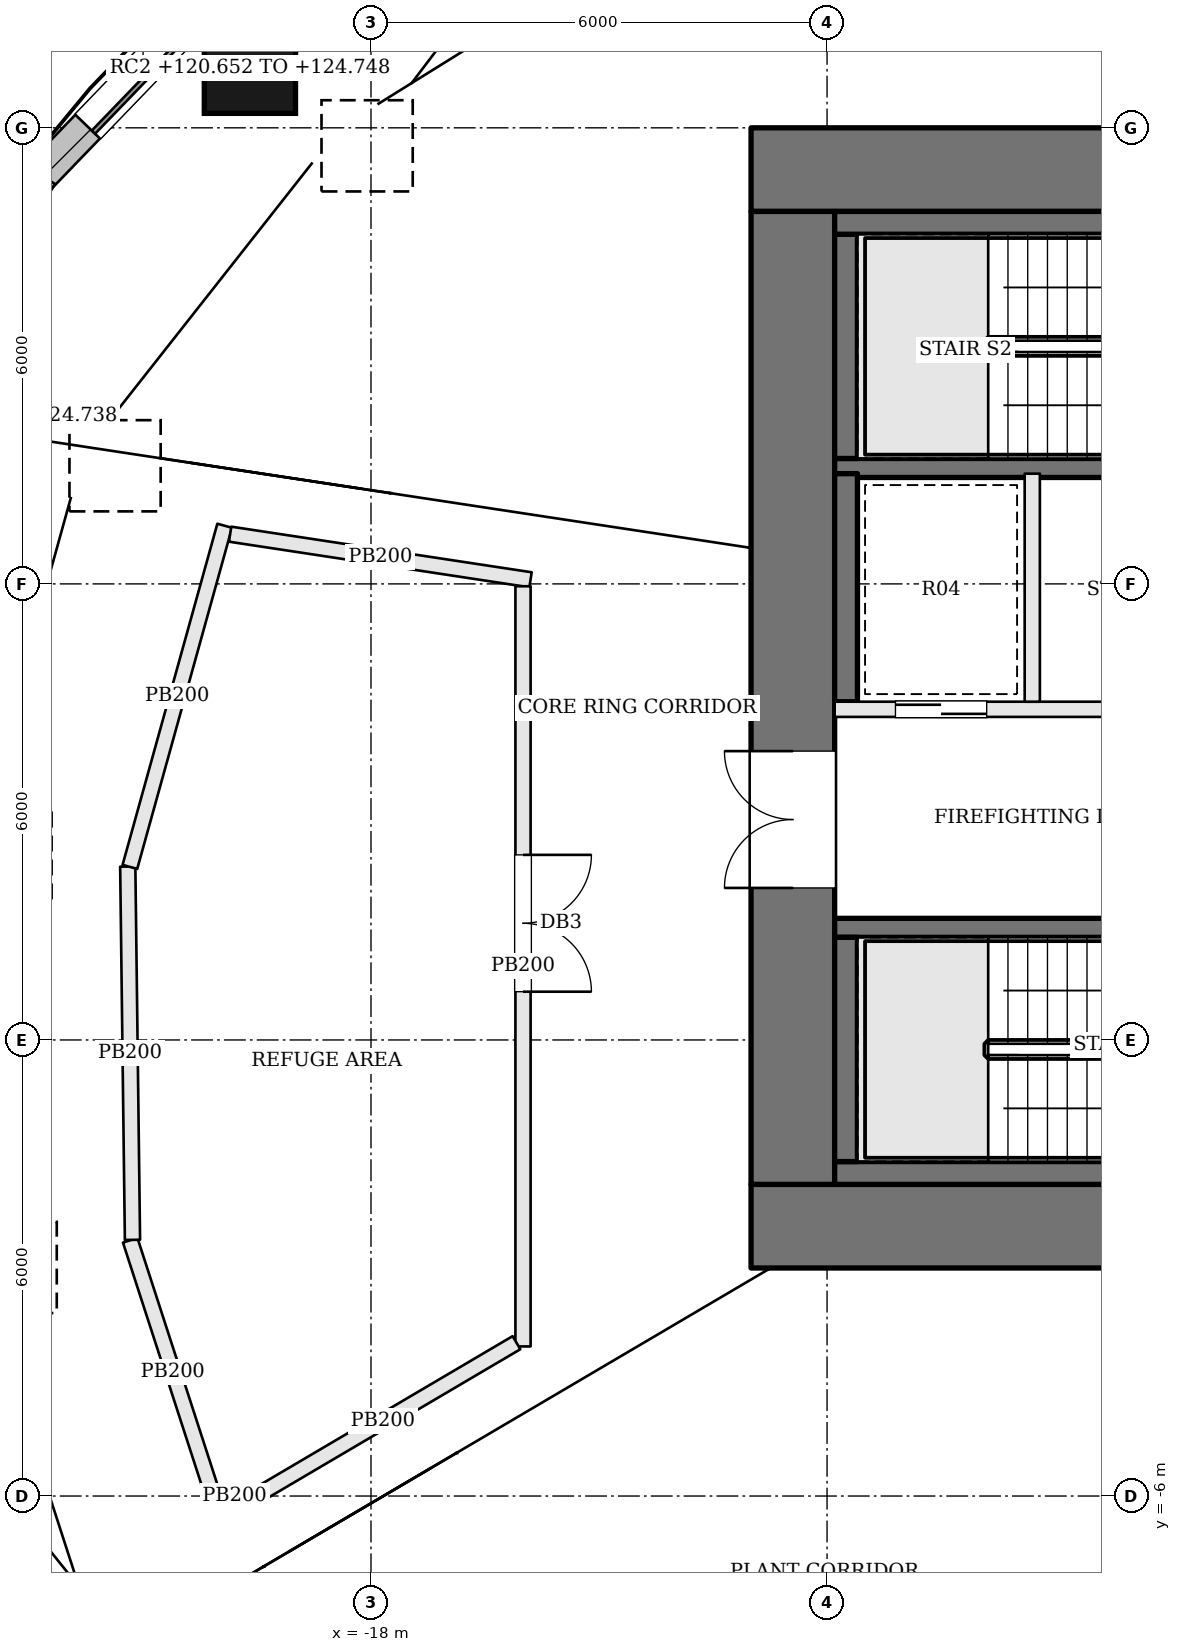
"""IFC4 building model, lengths in metres.
Left out: names, types, materials, properties, quantities, classifications, styles, units other than length and angle.
Written with IfcOpenShell. Run it as: python <this file> out.ifc"""

import sys

from ifc_helpers import new_model, si_unit, direction, frame, frame_2d, origin, origin_2d, place, context, subcontext, project, spatial, rectangle, extrude, element, fill, save


model = new_model("IFC4")
c1 = context("Model", 3, precision=1e-05, world=origin(), true_north=direction((0.0, 1.0)))
c2 = subcontext(c1, "Body", "Model", "MODEL_VIEW")
j1 = project(units=[si_unit("LENGTHUNIT", "METRE"), si_unit("PLANEANGLEUNIT", "RADIAN")], contexts=[c1])
p1 = place(None, origin())
s1 = spatial("IfcSite", under=j1, at=p1, CompositionType="ELEMENT")
p2 = place(p1, origin())
s2 = spatial("IfcBuilding", under=s1, at=p2, CompositionType="ELEMENT")
p3 = place(p2, frame((0.0, 0.0, 121.2)))
s3 = spatial("IfcBuildingStorey", under=s2, at=p3, CompositionType="ELEMENT", Elevation=121.2)
p4 = place(p3, frame((-13.0, 11.45, 0.0), z_axis=(0.0, 0.0, 1.0), x_axis=(1.0, 0.0, 0.0)))
e1 = element("IfcWall", 1, at=p4, inside=s3, PredefinedType="SHEAR", context=c2, shape_type="SweptSolid", body=[
    extrude(rectangle(XDim=26.0, YDim=1.1, at=frame_2d((13.0, 0.0))), origin(), (0.0, 0.0, 1.0), 4.5),
])
p5 = place(p4, frame((8.975, 0.0, 0.0)))
e2 = element("IfcOpeningElement", 2, at=p5, cuts=e1, PredefinedType="OPENING", context=c2, shape_type="SweptSolid", body=[
    extrude(rectangle(XDim=0.7, YDim=2.1, at=frame_2d((0.35, 1.05))), frame((0.0, 0.56, 0.0), z_axis=(0.0, -1.0, 0.0), x_axis=(1.0, 0.0, 0.0)), (0.0, 0.0, 1.0), 1.12),
])
p6 = place(p4, frame((11.575, 0.0, 0.0)))
e3 = element("IfcOpeningElement", 3, at=p6, cuts=e1, PredefinedType="OPENING", context=c2, shape_type="SweptSolid", body=[
    extrude(rectangle(XDim=1.2, YDim=2.1, at=frame_2d((0.6, 1.05))), frame((0.0, 0.56, 0.0), z_axis=(0.0, -1.0, 0.0), x_axis=(1.0, 0.0, 0.0)), (0.0, 0.0, 1.0), 1.12),
])
p7 = place(p4, frame((14.675, 0.0, 0.0)))
e4 = element("IfcOpeningElement", 4, at=p7, cuts=e1, PredefinedType="OPENING", context=c2, shape_type="SweptSolid", body=[
    extrude(rectangle(XDim=0.7, YDim=2.1, at=frame_2d((0.35, 1.05))), frame((0.0, 0.56, 0.0), z_axis=(0.0, -1.0, 0.0), x_axis=(1.0, 0.0, 0.0)), (0.0, 0.0, 1.0), 1.12),
])
p8 = place(p4, frame((16.725, 0.0, 0.0)))
e5 = element("IfcOpeningElement", 5, at=p8, cuts=e1, PredefinedType="OPENING", context=c2, shape_type="SweptSolid", body=[
    extrude(rectangle(XDim=0.7, YDim=2.1, at=frame_2d((0.35, 1.05))), frame((0.0, 0.56, 0.0), z_axis=(0.0, -1.0, 0.0), x_axis=(1.0, 0.0, 0.0)), (0.0, 0.0, 1.0), 1.12),
])
p9 = place(p4, frame((6.88, 0.0, 0.0)))
e6 = element("IfcOpeningElement", 6, at=p9, cuts=e1, PredefinedType="OPENING", context=c2, shape_type="SweptSolid", body=[
    extrude(rectangle(XDim=1.0, YDim=2.1, at=frame_2d((0.5, 1.05))), frame((0.0, 0.56, 0.0), z_axis=(0.0, -1.0, 0.0), x_axis=(1.0, 0.0, 0.0)), (0.0, 0.0, 1.0), 1.12),
])
p10 = place(p4, frame((18.12, 0.0, 0.0)))
e7 = element("IfcOpeningElement", 7, at=p10, cuts=e1, PredefinedType="OPENING", context=c2, shape_type="SweptSolid", body=[
    extrude(rectangle(XDim=1.0, YDim=2.1, at=frame_2d((0.5, 1.05))), frame((0.0, 0.56, 0.0), z_axis=(0.0, -1.0, 0.0), x_axis=(1.0, 0.0, 0.0)), (0.0, 0.0, 1.0), 1.12),
])
p11 = place(p3, frame((-13.0, -2.45, 0.0), z_axis=(0.0, 0.0, 1.0), x_axis=(1.0, 0.0, 0.0)))
e8 = element("IfcWall", 8, at=p11, inside=s3, PredefinedType="SHEAR", context=c2, shape_type="SweptSolid", body=[
    extrude(rectangle(XDim=26.0, YDim=1.1, at=frame_2d((13.0, 0.0))), origin(), (0.0, 0.0, 1.0), 4.5),
])
p12 = place(p11, frame((9.125, 0.0, 0.0)))
e9 = element("IfcOpeningElement", 9, at=p12, cuts=e8, PredefinedType="OPENING", context=c2, shape_type="SweptSolid", body=[
    extrude(rectangle(XDim=1.2, YDim=2.1, at=frame_2d((0.6, 1.05))), frame((0.0, 0.56, 0.0), z_axis=(0.0, -1.0, 0.0), x_axis=(1.0, 0.0, 0.0)), (0.0, 0.0, 1.0), 1.12),
])
p13 = place(p11, frame((12.375, 0.0, 0.0)))
e10 = element("IfcOpeningElement", 10, at=p13, cuts=e8, PredefinedType="OPENING", context=c2, shape_type="SweptSolid", body=[
    extrude(rectangle(XDim=1.2, YDim=2.1, at=frame_2d((0.6, 1.05))), frame((0.0, 0.56, 0.0), z_axis=(0.0, -1.0, 0.0), x_axis=(1.0, 0.0, 0.0)), (0.0, 0.0, 1.0), 1.12),
])
p14 = place(p11, frame((15.65, 0.0, 0.0)))
e11 = element("IfcOpeningElement", 11, at=p14, cuts=e8, PredefinedType="OPENING", context=c2, shape_type="SweptSolid", body=[
    extrude(rectangle(XDim=1.2, YDim=2.1, at=frame_2d((0.6, 1.05))), frame((0.0, 0.56, 0.0), z_axis=(0.0, -1.0, 0.0), x_axis=(1.0, 0.0, 0.0)), (0.0, 0.0, 1.0), 1.12),
])
p15 = place(p11, frame((6.88, 0.0, 0.0)))
e12 = element("IfcOpeningElement", 12, at=p15, cuts=e8, PredefinedType="OPENING", context=c2, shape_type="SweptSolid", body=[
    extrude(rectangle(XDim=1.0, YDim=2.1, at=frame_2d((0.5, 1.05))), frame((0.0, 0.56, 0.0), z_axis=(0.0, -1.0, 0.0), x_axis=(1.0, 0.0, 0.0)), (0.0, 0.0, 1.0), 1.12),
])
p16 = place(p11, frame((18.12, 0.0, 0.0)))
e13 = element("IfcOpeningElement", 13, at=p16, cuts=e8, PredefinedType="OPENING", context=c2, shape_type="SweptSolid", body=[
    extrude(rectangle(XDim=1.0, YDim=2.1, at=frame_2d((0.5, 1.05))), frame((0.0, 0.56, 0.0), z_axis=(0.0, -1.0, 0.0), x_axis=(1.0, 0.0, 0.0)), (0.0, 0.0, 1.0), 1.12),
])
p17 = place(p3, frame((-12.45, -1.9, 0.0), z_axis=(0.0, 0.0, 1.0), x_axis=(0.0, 1.0, 0.0)))
e14 = element("IfcWall", 14, at=p17, inside=s3, PredefinedType="SHEAR", context=c2, shape_type="SweptSolid", body=[
    extrude(rectangle(XDim=12.8, YDim=1.1, at=frame_2d((6.4, 0.0))), origin(), (0.0, 0.0, 1.0), 4.5),
])
p18 = place(p17, frame((3.9, 0.0, 0.0)))
e15 = element("IfcOpeningElement", 15, at=p18, cuts=e14, PredefinedType="OPENING", context=c2, shape_type="SweptSolid", body=[
    extrude(rectangle(XDim=1.8, YDim=2.1, at=frame_2d((0.9, 1.05))), frame((0.0, 0.56, 0.0), z_axis=(0.0, -1.0, 0.0), x_axis=(1.0, 0.0, 0.0)), (0.0, 0.0, 1.0), 1.12),
])
p19 = place(p3, frame((-19.593, 12.79, -0.548), z_axis=(0.343008470869, -0.228473185077, 0.911123039229), x_axis=(0.554365652735, 0.832273226211, 0.0)))
e16 = element("IfcColumn", 16, at=p19, inside=s3, PredefinedType="COLUMN", context=c2, shape_type="SweptSolid", body=[
    extrude(rectangle(XDim=1.2, YDim=1.2, at=origin_2d()), origin(), (0.0, 0.0, 1.0), 4.496),
])
p20 = place(p3, frame((-23.185, 8.21, -0.538), z_axis=(0.403040867298, -0.145423769361, 0.903554086147), x_axis=(0.339399243932, 0.940642415171, 0.0)))
e17 = element("IfcColumn", 17, at=p20, inside=s3, PredefinedType="COLUMN", context=c2, shape_type="SweptSolid", body=[
    extrude(rectangle(XDim=1.2, YDim=1.2, at=origin_2d()), origin(), (0.0, 0.0, 1.0), 4.511),
])
p21 = place(p3, frame((-24.669, -3.248, -0.536), z_axis=(0.428524757066, 0.056498658987, 0.90176185), x_axis=(-0.130713362485, 0.991420201967, 0.0)))
e18 = element("IfcColumn", 18, at=p21, inside=s3, PredefinedType="COLUMN", context=c2, shape_type="SweptSolid", body=[
    extrude(rectangle(XDim=1.2, YDim=1.2, at=origin_2d()), origin(), (0.0, 0.0, 1.0), 4.516),
])
p22 = place(p3, frame((-19.611, 14.21, 0.0), z_axis=(0.0, 0.0, 1.0), x_axis=(-0.694225992979, -0.719757091436, 0.0)))
e19 = element("IfcWall", 19, at=p22, inside=s3, PredefinedType="SOLIDWALL", context=c2, shape_type="SweptSolid", body=[
    extrude(rectangle(XDim=3.997, YDim=0.45, at=frame_2d((1.999, 0.0))), origin(), (0.0, 0.0, 1.0), 4.3),
])
p23 = place(p22, frame((0.948, 0.0, 1.2)))
e20 = element("IfcOpeningElement", 20, at=p23, cuts=e19, PredefinedType="OPENING", context=c2, shape_type="SweptSolid", body=[
    extrude(rectangle(XDim=2.1, YDim=1.8, at=frame_2d((1.05, 0.9))), frame((0.0, 0.235, 0.0), z_axis=(0.0, -1.0, 0.0), x_axis=(1.0, 0.0, 0.0)), (0.0, 0.0, 1.0), 0.47),
])
p24 = place(p3, frame((-22.354, 11.376, 0.0), z_axis=(0.0, 0.0, 1.0), x_axis=(-0.502055516261, -0.864835393929, 0.0)))
e21 = element("IfcWall", 21, at=p24, inside=s3, PredefinedType="SOLIDWALL", context=c2, shape_type="SweptSolid", body=[
    extrude(rectangle(XDim=4.049, YDim=0.45, at=frame_2d((2.025, 0.0))), origin(), (0.0, 0.0, 1.0), 4.3),
])
p25 = place(p24, frame((0.975, 0.0, 1.2)))
e22 = element("IfcOpeningElement", 22, at=p25, cuts=e21, PredefinedType="OPENING", context=c2, shape_type="SweptSolid", body=[
    extrude(rectangle(XDim=2.1, YDim=1.8, at=frame_2d((1.05, 0.9))), frame((0.0, 0.235, 0.0), z_axis=(0.0, -1.0, 0.0), x_axis=(1.0, 0.0, 0.0)), (0.0, 0.0, 1.0), 0.47),
])
p26 = place(p3, frame((-11.9, 1.475, 0.0), z_axis=(0.0, 0.0, 1.0), x_axis=(1.0, 0.0, 0.0)))
e23 = element("IfcWall", 23, at=p26, inside=s3, PredefinedType="SOLIDWALL", context=c2, shape_type="SweptSolid", body=[
    extrude(rectangle(XDim=6.8, YDim=0.25, at=frame_2d((3.4, 0.0))), origin(), (0.0, 0.0, 1.0), 4.3),
])
p27 = place(p26, frame((5.5, 0.0, 0.0)))
e24 = element("IfcOpeningElement", 24, at=p27, cuts=e23, PredefinedType="OPENING", context=c2, shape_type="SweptSolid", body=[
    extrude(rectangle(XDim=1.2, YDim=2.1, at=frame_2d((0.6, 1.05))), frame((0.0, 0.135, 0.0), z_axis=(0.0, -1.0, 0.0), x_axis=(1.0, 0.0, 0.0)), (0.0, 0.0, 1.0), 0.27),
])
p28 = place(p3, frame((-11.9, 4.35, 0.0), z_axis=(0.0, 0.0, 1.0), x_axis=(1.0, 0.0, 0.0)))
e25 = element("IfcWall", 25, at=p28, inside=s3, PredefinedType="SOLIDWALL", context=c2, shape_type="SweptSolid", body=[
    extrude(rectangle(XDim=6.8, YDim=0.2, at=frame_2d((3.4, 0.0))), origin(), (0.0, 0.0, 1.0), 4.3),
])
p29 = place(p28, frame((4.1, 0.0, 0.0)))
e26 = element("IfcOpeningElement", 26, at=p29, cuts=e25, PredefinedType="OPENING", context=c2, shape_type="SweptSolid", body=[
    extrude(rectangle(XDim=1.2, YDim=2.1, at=frame_2d((0.6, 1.05))), frame((0.0, 0.11, 0.0), z_axis=(0.0, -1.0, 0.0), x_axis=(1.0, 0.0, 0.0)), (0.0, 0.0, 1.0), 0.22),
])
p30 = place(p28, frame((0.8, 0.0, 0.0)))
e27 = element("IfcOpeningElement", 27, at=p30, cuts=e25, PredefinedType="OPENING", context=c2, shape_type="SweptSolid", body=[
    extrude(rectangle(XDim=1.2, YDim=2.1, at=frame_2d((0.6, 1.05))), frame((0.0, 0.11, 0.0), z_axis=(0.0, -1.0, 0.0), x_axis=(1.0, 0.0, 0.0)), (0.0, 0.0, 1.0), 0.22),
])
p31 = place(p3, frame((-11.9, 7.525, 0.0), z_axis=(0.0, 0.0, 1.0), x_axis=(1.0, 0.0, 0.0)))
e28 = element("IfcWall", 28, at=p31, inside=s3, PredefinedType="SOLIDWALL", context=c2, shape_type="SweptSolid", body=[
    extrude(rectangle(XDim=6.8, YDim=0.25, at=frame_2d((3.4, 0.0))), origin(), (0.0, 0.0, 1.0), 4.3),
])
p32 = place(p31, frame((5.5, 0.0, 0.0)))
e29 = element("IfcOpeningElement", 29, at=p32, cuts=e28, PredefinedType="OPENING", context=c2, shape_type="SweptSolid", body=[
    extrude(rectangle(XDim=1.2, YDim=2.1, at=frame_2d((0.6, 1.05))), frame((0.0, 0.135, 0.0), z_axis=(0.0, -1.0, 0.0), x_axis=(1.0, 0.0, 0.0)), (0.0, 0.0, 1.0), 0.27),
])
p33 = place(p3, frame((-9.3, 4.45, 0.0), z_axis=(0.0, 0.0, 1.0), x_axis=(0.0, 1.0, 0.0)))
e30 = element("IfcWall", 30, at=p33, inside=s3, PredefinedType="SOLIDWALL", context=c2, shape_type="SweptSolid", body=[
    extrude(rectangle(XDim=3.0, YDim=0.2, at=frame_2d((1.5, 0.0))), origin(), (0.0, 0.0, 1.0), 4.3),
])
p34 = place(p3, frame((-11.9, -1.75, 0.0), z_axis=(0.0, 0.0, 1.0), x_axis=(1.0, 0.0, 0.0)))
e31 = element("IfcWall", 31, at=p34, inside=s3, PredefinedType="SOLIDWALL", context=c2, shape_type="SweptSolid", body=[
    extrude(rectangle(XDim=5.78, YDim=0.3, at=frame_2d((2.89, 0.0))), origin(), (0.0, 0.0, 1.0), 4.3),
])
p35 = place(p3, frame((-11.75, -1.6, 0.0), z_axis=(0.0, 0.0, 1.0), x_axis=(0.0, 1.0, 0.0)))
e32 = element("IfcWall", 32, at=p35, inside=s3, PredefinedType="SOLIDWALL", context=c2, shape_type="SweptSolid", body=[
    extrude(rectangle(XDim=2.95, YDim=0.3, at=frame_2d((1.475, 0.0))), origin(), (0.0, 0.0, 1.0), 4.3),
])
p36 = place(p3, frame((-11.75, 4.45, 0.0), z_axis=(0.0, 0.0, 1.0), x_axis=(0.0, 1.0, 0.0)))
e33 = element("IfcWall", 33, at=p36, inside=s3, PredefinedType="SOLIDWALL", context=c2, shape_type="SweptSolid", body=[
    extrude(rectangle(XDim=3.0, YDim=0.3, at=frame_2d((1.5, 0.0))), origin(), (0.0, 0.0, 1.0), 4.3),
])
p37 = place(p3, frame((-11.75, 7.65, 0.0), z_axis=(0.0, 0.0, 1.0), x_axis=(0.0, 1.0, 0.0)))
e34 = element("IfcWall", 34, at=p37, inside=s3, PredefinedType="SOLIDWALL", context=c2, shape_type="SweptSolid", body=[
    extrude(rectangle(XDim=2.95, YDim=0.3, at=frame_2d((1.475, 0.0))), origin(), (0.0, 0.0, 1.0), 4.3),
])
p38 = place(p3, frame((-11.9, 10.75, 0.0), z_axis=(0.0, 0.0, 1.0), x_axis=(1.0, 0.0, 0.0)))
e35 = element("IfcWall", 35, at=p38, inside=s3, PredefinedType="SOLIDWALL", context=c2, shape_type="SweptSolid", body=[
    extrude(rectangle(XDim=5.78, YDim=0.3, at=frame_2d((2.89, 0.0))), origin(), (0.0, 0.0, 1.0), 4.3),
])
p39 = place(p3, frame((-20.046, -6.095, 0.0), z_axis=(0.0, 0.0, 1.0), x_axis=(-0.308485001062, 0.951229206931, 0.0)))
e36 = element("IfcWall", 36, at=p39, inside=s3, PredefinedType="PARTITIONING", context=c2, shape_type="SweptSolid", body=[
    extrude(rectangle(XDim=3.637, YDim=0.2, at=frame_2d((1.819, 0.0))), origin(), (0.0, 0.0, 1.0), 4.3),
])
p40 = place(p3, frame((-21.138, -2.63, 0.0), z_axis=(0.0, 0.0, 1.0), x_axis=(-0.012626385888, 0.999920284012, 0.0)))
e37 = element("IfcWall", 37, at=p40, inside=s3, PredefinedType="PARTITIONING", context=c2, shape_type="SweptSolid", body=[
    extrude(rectangle(XDim=4.911, YDim=0.2, at=frame_2d((2.456, 0.0))), origin(), (0.0, 0.0, 1.0), 4.3),
])
p41 = place(p3, frame((-21.172, 2.277, 0.0), z_axis=(0.0, 0.0, 1.0), x_axis=(0.267735776536, 0.963492373588, 0.0)))
e38 = element("IfcWall", 38, at=p41, inside=s3, PredefinedType="PARTITIONING", context=c2, shape_type="SweptSolid", body=[
    extrude(rectangle(XDim=4.658, YDim=0.2, at=frame_2d((2.329, 0.0))), origin(), (0.0, 0.0, 1.0), 4.3),
])
p42 = place(p3, frame((-19.853, 6.654, 0.0), z_axis=(0.0, 0.0, 1.0), x_axis=(0.988667757091, -0.15012017216, 0.0)))
e39 = element("IfcWall", 39, at=p42, inside=s3, PredefinedType="PARTITIONING", context=c2, shape_type="SweptSolid", body=[
    extrude(rectangle(XDim=3.998, YDim=0.2, at=frame_2d((1.999, 0.0))), origin(), (0.0, 0.0, 1.0), 4.3),
])
p43 = place(p3, frame((-16.0, 5.969, 0.0), z_axis=(0.0, 0.0, 1.0), x_axis=(0.0, -1.0, 0.0)))
e40 = element("IfcWall", 40, at=p43, inside=s3, PredefinedType="PARTITIONING", context=c2, shape_type="SweptSolid", body=[
    extrude(rectangle(XDim=10.001, YDim=0.2, at=frame_2d((5.0, 0.0))), origin(), (0.0, 0.0, 1.0), 4.3),
])
p44 = place(p43, frame((3.534, 0.0, 0.0)))
e41 = element("IfcOpeningElement", 41, at=p44, cuts=e40, PredefinedType="OPENING", context=c2, shape_type="SweptSolid", body=[
    extrude(rectangle(XDim=1.8, YDim=2.1, at=frame_2d((0.9, 1.05))), frame((0.0, 0.11, 0.0), z_axis=(0.0, -1.0, 0.0), x_axis=(1.0, 0.0, 0.0)), (0.0, 0.0, 1.0), 0.22),
])
p45 = place(p3, frame((-16.086, -3.983, 0.0), z_axis=(0.0, 0.0, 1.0), x_axis=(-0.861769442787, -0.5073001355, 0.0)))
e42 = element("IfcWall", 42, at=p45, inside=s3, PredefinedType="PARTITIONING", context=c2, shape_type="SweptSolid", body=[
    extrude(rectangle(XDim=4.077, YDim=0.2, at=frame_2d((2.038, 0.0))), origin(), (0.0, 0.0, 1.0), 4.3),
])
p46 = place(p3, frame((-19.613, -6.0, 0.0), z_axis=(0.0, 0.0, 1.0), x_axis=(-1.0, 0.0, 0.0)))
e43 = element("IfcWall", 43, at=p46, inside=s3, PredefinedType="PARTITIONING", context=c2, shape_type="SweptSolid", body=[
    extrude(rectangle(XDim=0.364, YDim=0.2, at=frame_2d((0.182, 0.0))), origin(), (0.0, 0.0, 1.0), 4.3),
])
p47 = place(p23, origin())
e44 = element("IfcWindow", 44, at=p47, inside=s3, PartitioningType="SINGLE_PANEL", PredefinedType="WINDOW", context=c2, shape_type="SweptSolid", body=[
    extrude(rectangle(XDim=2.1, YDim=1.8, at=frame_2d((1.05, 0.9))), frame((0.0, 0.135, 0.0), z_axis=(0.0, -1.0, 0.0), x_axis=(1.0, 0.0, 0.0)), (0.0, 0.0, 1.0), 0.06),
])
fill(e20, e44)
p48 = place(p18, origin())
e45 = element("IfcDoor", 45, at=p48, inside=s3, OperationType="DOUBLE_DOOR_SINGLE_SWING", PredefinedType="DOOR", context=c2, shape_type="SweptSolid", body=[
    extrude(rectangle(XDim=1.8, YDim=2.1, at=frame_2d((0.9, 1.05))), frame((0.0, 0.025, 0.0), z_axis=(0.0, -1.0, 0.0), x_axis=(1.0, 0.0, 0.0)), (0.0, 0.0, 1.0), 0.05),
])
fill(e15, e45)
p49 = place(p30, origin())
e46 = element("IfcDoor", 46, at=p49, inside=s3, OperationType="SLIDING_TO_RIGHT", PredefinedType="DOOR", context=c2, shape_type="SweptSolid", body=[
    extrude(rectangle(XDim=1.2, YDim=2.1, at=frame_2d((0.6, 1.05))), frame((0.0, 0.025, 0.0), z_axis=(0.0, -1.0, 0.0), x_axis=(1.0, 0.0, 0.0)), (0.0, 0.0, 1.0), 0.05),
])
fill(e27, e46)
p50 = place(p44, origin())
e47 = element("IfcDoor", 47, at=p50, inside=s3, OperationType="DOUBLE_DOOR_SINGLE_SWING", PredefinedType="DOOR", context=c2, shape_type="SweptSolid", body=[
    extrude(rectangle(XDim=1.8, YDim=2.1, at=frame_2d((0.9, 1.05))), frame((0.0, 0.025, 0.0), z_axis=(0.0, -1.0, 0.0), x_axis=(1.0, 0.0, 0.0)), (0.0, 0.0, 1.0), 0.05),
])
fill(e41, e47)
save(model, sys.argv[1])
